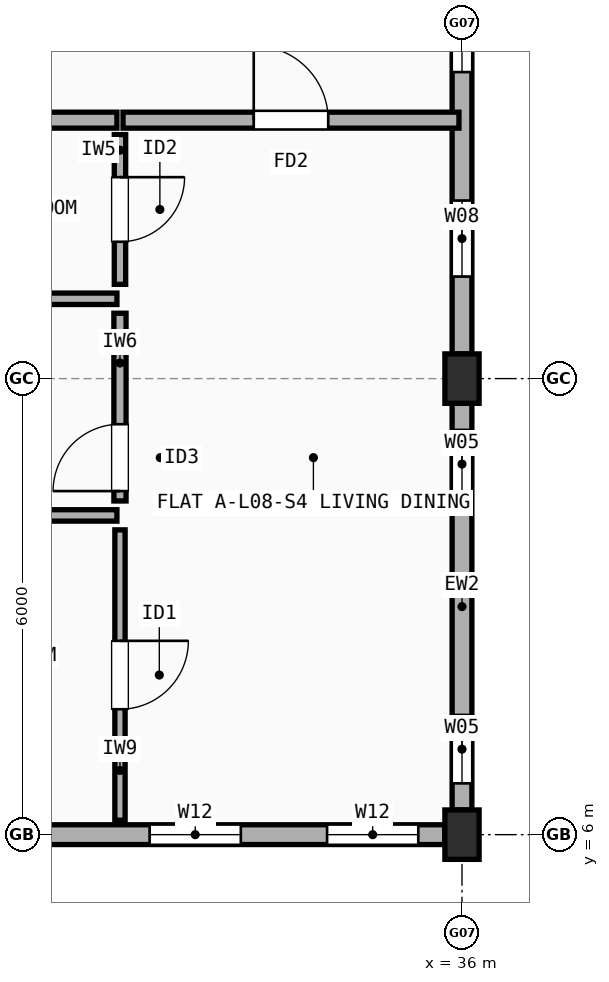
"""IFC4 building model, lengths in metres.
Left out: names, types, materials, properties, quantities, classifications, styles, units other than length and angle.
Written with IfcOpenShell. Run it as: python <this file> out.ifc"""

import sys

from ifc_helpers import new_model, si_unit, direction, frame, frame_2d, origin, origin_2d, place, context, subcontext, project, spatial, rectangle, extrude, element, fill, save


model = new_model("IFC4")
c1 = context("Model", 3, precision=1e-05, world=origin(), true_north=direction((0.0, 1.0)))
c2 = subcontext(c1, "Body", "Model", "MODEL_VIEW")
j1 = project(units=[si_unit("LENGTHUNIT", "METRE"), si_unit("PLANEANGLEUNIT", "RADIAN")], contexts=[c1])
p1 = place(None, origin())
s1 = spatial("IfcSite", under=j1, at=p1, CompositionType="ELEMENT")
p2 = place(p1, origin())
s2 = spatial("IfcBuilding", under=s1, at=p2, CompositionType="ELEMENT")
p3 = place(p2, frame((0.0, 0.0, 26.9)))
s3 = spatial("IfcBuildingStorey", under=s2, at=p3, CompositionType="ELEMENT", Elevation=26.9)
for number, where, z_axis, x_axis in (
    (1, (36.0, 6.0, 0.0), (0.0, 0.0, 1.0), (1.0, 0.0, 0.0)),
    (2, (36.0, 12.0, 0.0), (0.0, 0.0, 1.0), (1.0, 0.0, 0.0)),
):
    element("IfcColumn", number, at=place(p3, frame(where, z_axis=z_axis, x_axis=x_axis)), inside=s3, PredefinedType="COLUMN", context=c2, shape_type="SweptSolid", body=[
        extrude(rectangle(XDim=0.45, YDim=0.65, at=origin_2d()), origin(), (0.0, 0.0, 1.0), 2.98),
    ])
p4 = place(p3, frame((30.225, 6.0, 0.0), z_axis=(0.0, 0.0, 1.0), x_axis=(1.0, 0.0, 0.0)))
e3 = element("IfcWall", 3, at=p4, inside=s3, PredefinedType="STANDARD", context=c2, shape_type="SweptSolid", body=[
    extrude(rectangle(XDim=5.55, YDim=0.26, at=frame_2d((2.775, 0.0))), origin(), (0.0, 0.0, 1.0), 2.462),
])
p5 = place(p4, frame((1.665, 0.0, 0.9)))
e4 = element("IfcOpeningElement", 4, at=p5, cuts=e3, PredefinedType="OPENING", context=c2, shape_type="SweptSolid", body=[
    extrude(rectangle(XDim=1.2, YDim=1.35, at=frame_2d((0.6, 0.675))), frame((0.0, 0.14, 0.0), z_axis=(0.0, -1.0, 0.0), x_axis=(1.0, 0.0, 0.0)), (0.0, 0.0, 1.0), 0.28),
])
p6 = place(p4, frame((4.0, 0.0, 0.9)))
e5 = element("IfcOpeningElement", 5, at=p6, cuts=e3, PredefinedType="OPENING", context=c2, shape_type="SweptSolid", body=[
    extrude(rectangle(XDim=1.2, YDim=1.35, at=frame_2d((0.6, 0.675))), frame((0.0, 0.14, 0.0), z_axis=(0.0, -1.0, 0.0), x_axis=(1.0, 0.0, 0.0)), (0.0, 0.0, 1.0), 0.28),
])
p7 = place(p3, frame((36.0, 6.325, 0.0), z_axis=(0.0, 0.0, 1.0), x_axis=(0.0, 1.0, 0.0)))
e6 = element("IfcWall", 6, at=p7, inside=s3, PredefinedType="STANDARD", context=c2, shape_type="SweptSolid", body=[
    extrude(rectangle(XDim=5.35, YDim=0.26, at=frame_2d((2.675, 0.0))), origin(), (0.0, 0.0, 1.0), 2.462),
])
p8 = place(p7, frame((0.35, 0.0, 0.9)))
e7 = element("IfcOpeningElement", 7, at=p8, cuts=e6, PredefinedType="OPENING", context=c2, shape_type="SweptSolid", body=[
    extrude(rectangle(XDim=0.9, YDim=1.4, at=frame_2d((0.45, 0.7))), frame((0.0, 0.14, 0.0), z_axis=(0.0, -1.0, 0.0), x_axis=(1.0, 0.0, 0.0)), (0.0, 0.0, 1.0), 0.28),
])
p9 = place(p7, frame((4.1, 0.0, 0.9)))
e8 = element("IfcOpeningElement", 8, at=p9, cuts=e6, PredefinedType="OPENING", context=c2, shape_type="SweptSolid", body=[
    extrude(rectangle(XDim=0.9, YDim=1.4, at=frame_2d((0.45, 0.7))), frame((0.0, 0.14, 0.0), z_axis=(0.0, -1.0, 0.0), x_axis=(1.0, 0.0, 0.0)), (0.0, 0.0, 1.0), 0.28),
])
p10 = place(p3, frame((36.0, 12.325, 0.0), z_axis=(0.0, 0.0, 1.0), x_axis=(0.0, 1.0, 0.0)))
e9 = element("IfcWall", 9, at=p10, inside=s3, PredefinedType="STANDARD", context=c2, shape_type="SweptSolid", body=[
    extrude(rectangle(XDim=5.35, YDim=0.26, at=frame_2d((2.675, 0.0))), origin(), (0.0, 0.0, 1.0), 2.462),
])
p11 = place(p10, frame((1.018, 0.0, 0.9)))
e10 = element("IfcOpeningElement", 10, at=p11, cuts=e9, PredefinedType="OPENING", context=c2, shape_type="SweptSolid", body=[
    extrude(rectangle(XDim=1.0, YDim=1.4, at=frame_2d((0.5, 0.7))), frame((0.0, 0.14, 0.0), z_axis=(0.0, -1.0, 0.0), x_axis=(1.0, 0.0, 0.0)), (0.0, 0.0, 1.0), 0.28),
])
p12 = place(p10, frame((3.708, 0.0, 0.9)))
e11 = element("IfcOpeningElement", 11, at=p12, cuts=e9, PredefinedType="OPENING", context=c2, shape_type="SweptSolid", body=[
    extrude(rectangle(XDim=1.05, YDim=1.35, at=frame_2d((0.525, 0.675))), frame((0.0, 0.14, 0.0), z_axis=(0.0, -1.0, 0.0), x_axis=(1.0, 0.0, 0.0)), (0.0, 0.0, 1.0), 0.28),
])
p13 = place(p3, frame((27.04, 15.4, 0.0), z_axis=(0.0, 0.0, 1.0), x_axis=(1.0, 0.0, 0.0)))
e12 = element("IfcWall", 12, at=p13, inside=s3, PredefinedType="SOLIDWALL", context=c2, shape_type="SweptSolid", body=[
    extrude(rectangle(XDim=4.42, YDim=0.21, at=frame_2d((2.21, 0.0))), origin(), (0.0, 0.0, 1.0), 2.462),
])
p14 = place(p3, frame((31.54, 15.4, 0.0), z_axis=(0.0, 0.0, 1.0), x_axis=(1.0, 0.0, 0.0)))
e13 = element("IfcWall", 13, at=p14, inside=s3, PredefinedType="SOLIDWALL", context=c2, shape_type="SweptSolid", body=[
    extrude(rectangle(XDim=4.42, YDim=0.21, at=frame_2d((2.21, 0.0))), origin(), (0.0, 0.0, 1.0), 2.462),
])
p15 = place(p14, frame((1.72, 0.0, 0.0)))
e14 = element("IfcOpeningElement", 14, at=p15, cuts=e13, PredefinedType="OPENING", context=c2, shape_type="SweptSolid", body=[
    extrude(rectangle(XDim=0.98, YDim=2.15, at=frame_2d((0.49, 1.075))), frame((0.0, 0.115, 0.0), z_axis=(0.0, -1.0, 0.0), x_axis=(1.0, 0.0, 0.0)), (0.0, 0.0, 1.0), 0.23),
])
p16 = place(p3, frame((31.5, 6.19, 0.0), z_axis=(0.0, 0.0, 1.0), x_axis=(0.0, 1.0, 0.0)))
e15 = element("IfcWall", 15, at=p16, inside=s3, PredefinedType="PARTITIONING", context=c2, shape_type="SweptSolid", body=[
    extrude(rectangle(XDim=3.82, YDim=0.135, at=frame_2d((1.91, 0.0))), origin(), (0.0, 0.0, 1.0), 2.98),
])
p17 = place(p16, frame((1.46, 0.0, 0.0)))
e16 = element("IfcOpeningElement", 16, at=p17, cuts=e15, PredefinedType="OPENING", context=c2, shape_type="SweptSolid", body=[
    extrude(rectangle(XDim=0.9, YDim=2.1, at=frame_2d((0.45, 1.05))), frame((0.0, 0.077, 0.0), z_axis=(0.0, -1.0, 0.0), x_axis=(1.0, 0.0, 0.0)), (0.0, 0.0, 1.0), 0.155),
])
p18 = place(p3, frame((31.5, 10.39, 0.0), z_axis=(0.0, 0.0, 1.0), x_axis=(0.0, 1.0, 0.0)))
e17 = element("IfcWall", 17, at=p18, inside=s3, PredefinedType="PLUMBINGWALL", context=c2, shape_type="SweptSolid", body=[
    extrude(rectangle(XDim=2.47, YDim=0.16, at=frame_2d((1.235, 0.0))), origin(), (0.0, 0.0, 1.0), 2.548),
])
p19 = place(p18, frame((0.13, 0.0, 0.0)))
e18 = element("IfcOpeningElement", 18, at=p19, cuts=e17, PredefinedType="OPENING", context=c2, shape_type="SweptSolid", body=[
    extrude(rectangle(XDim=0.88, YDim=2.1, at=frame_2d((0.44, 1.05))), frame((0.0, 0.09, 0.0), z_axis=(0.0, -1.0, 0.0), x_axis=(1.0, 0.0, 0.0)), (0.0, 0.0, 1.0), 0.18),
])
p20 = place(p3, frame((31.5, 13.24, 0.0), z_axis=(0.0, 0.0, 1.0), x_axis=(0.0, 1.0, 0.0)))
e19 = element("IfcWall", 19, at=p20, inside=s3, PredefinedType="PARTITIONING", context=c2, shape_type="SweptSolid", body=[
    extrude(rectangle(XDim=1.97, YDim=0.15, at=frame_2d((0.985, 0.0))), origin(), (0.0, 0.0, 1.0), 2.98),
])
p21 = place(p20, frame((0.56, 0.0, 0.0)))
e20 = element("IfcOpeningElement", 20, at=p21, cuts=e19, PredefinedType="OPENING", context=c2, shape_type="SweptSolid", body=[
    extrude(rectangle(XDim=0.85, YDim=2.1, at=frame_2d((0.425, 1.05))), frame((0.0, 0.085, 0.0), z_axis=(0.0, -1.0, 0.0), x_axis=(1.0, 0.0, 0.0)), (0.0, 0.0, 1.0), 0.17),
])
for number, where, z_axis, x_axis in (
    (21, (27.04, 10.2, 0.0), (0.0, 0.0, 1.0), (1.0, 0.0, 0.0)),
    (22, (27.04, 13.05, 0.0), (0.0, 0.0, 1.0), (1.0, 0.0, 0.0)),
):
    element("IfcWall", number, at=place(p3, frame(where, z_axis=z_axis, x_axis=x_axis)), inside=s3, PredefinedType="PARTITIONING", context=c2, shape_type="SweptSolid", body=[
        extrude(rectangle(XDim=4.42, YDim=0.15, at=frame_2d((2.21, 0.0))), origin(), (0.0, 0.0, 1.0), 2.462),
    ])
p22 = place(p5, origin())
e23 = element("IfcWindow", 23, at=p22, inside=s3, PartitioningType="SINGLE_PANEL", PredefinedType="WINDOW", context=c2, shape_type="SweptSolid", body=[
    extrude(rectangle(XDim=1.2, YDim=1.35, at=frame_2d((0.6, 0.675))), frame((0.0, 0.03, 0.0), z_axis=(0.0, -1.0, 0.0), x_axis=(1.0, 0.0, 0.0)), (0.0, 0.0, 1.0), 0.06),
])
fill(e4, e23)
p23 = place(p6, origin())
e24 = element("IfcWindow", 24, at=p23, inside=s3, PartitioningType="SINGLE_PANEL", PredefinedType="WINDOW", context=c2, shape_type="SweptSolid", body=[
    extrude(rectangle(XDim=1.2, YDim=1.35, at=frame_2d((0.6, 0.675))), frame((0.0, 0.03, 0.0), z_axis=(0.0, -1.0, 0.0), x_axis=(1.0, 0.0, 0.0)), (0.0, 0.0, 1.0), 0.06),
])
fill(e5, e24)
p24 = place(p8, origin())
e25 = element("IfcWindow", 25, at=p24, inside=s3, PartitioningType="SINGLE_PANEL", PredefinedType="WINDOW", context=c2, shape_type="SweptSolid", body=[
    extrude(rectangle(XDim=0.9, YDim=1.4, at=frame_2d((0.45, 0.7))), frame((0.0, 0.03, 0.0), z_axis=(0.0, -1.0, 0.0), x_axis=(1.0, 0.0, 0.0)), (0.0, 0.0, 1.0), 0.06),
])
fill(e7, e25)
p25 = place(p9, origin())
e26 = element("IfcWindow", 26, at=p25, inside=s3, PartitioningType="SINGLE_PANEL", PredefinedType="WINDOW", context=c2, shape_type="SweptSolid", body=[
    extrude(rectangle(XDim=0.9, YDim=1.4, at=frame_2d((0.45, 0.7))), frame((0.0, 0.03, 0.0), z_axis=(0.0, -1.0, 0.0), x_axis=(1.0, 0.0, 0.0)), (0.0, 0.0, 1.0), 0.06),
])
fill(e8, e26)
p26 = place(p11, origin())
e27 = element("IfcWindow", 27, at=p26, inside=s3, PartitioningType="SINGLE_PANEL", PredefinedType="WINDOW", context=c2, shape_type="SweptSolid", body=[
    extrude(rectangle(XDim=1.0, YDim=1.4, at=frame_2d((0.5, 0.7))), frame((0.0, 0.03, 0.0), z_axis=(0.0, -1.0, 0.0), x_axis=(1.0, 0.0, 0.0)), (0.0, 0.0, 1.0), 0.06),
])
fill(e10, e27)
p27 = place(p12, origin())
e28 = element("IfcWindow", 28, at=p27, inside=s3, PartitioningType="SINGLE_PANEL", PredefinedType="WINDOW", context=c2, shape_type="SweptSolid", body=[
    extrude(rectangle(XDim=1.05, YDim=1.35, at=frame_2d((0.525, 0.675))), frame((0.0, 0.03, 0.0), z_axis=(0.0, -1.0, 0.0), x_axis=(1.0, 0.0, 0.0)), (0.0, 0.0, 1.0), 0.06),
])
fill(e11, e28)
p28 = place(p15, origin())
e29 = element("IfcDoor", 29, at=p28, inside=s3, OperationType="SINGLE_SWING_LEFT", PredefinedType="DOOR", context=c2, shape_type="SweptSolid", body=[
    extrude(rectangle(XDim=0.98, YDim=2.15, at=frame_2d((0.49, 1.075))), frame((0.0, 0.025, 0.0), z_axis=(0.0, -1.0, 0.0), x_axis=(1.0, 0.0, 0.0)), (0.0, 0.0, 1.0), 0.05),
])
fill(e14, e29)
p29 = place(p17, origin())
e30 = element("IfcDoor", 30, at=p29, inside=s3, OperationType="SINGLE_SWING_RIGHT", PredefinedType="DOOR", context=c2, shape_type="SweptSolid", body=[
    extrude(rectangle(XDim=0.9, YDim=2.1, at=frame_2d((0.45, 1.05))), frame((0.0, 0.025, 0.0), z_axis=(0.0, -1.0, 0.0), x_axis=(1.0, 0.0, 0.0)), (0.0, 0.0, 1.0), 0.05),
])
fill(e16, e30)
p30 = place(p19, origin())
e31 = element("IfcDoor", 31, at=p30, inside=s3, OperationType="SINGLE_SWING_LEFT", PredefinedType="DOOR", context=c2, shape_type="SweptSolid", body=[
    extrude(rectangle(XDim=0.88, YDim=2.1, at=frame_2d((0.44, 1.05))), frame((0.0, 0.025, 0.0), z_axis=(0.0, -1.0, 0.0), x_axis=(1.0, 0.0, 0.0)), (0.0, 0.0, 1.0), 0.05),
])
fill(e18, e31)
p31 = place(p21, origin())
e32 = element("IfcDoor", 32, at=p31, inside=s3, OperationType="SINGLE_SWING_RIGHT", PredefinedType="DOOR", context=c2, shape_type="SweptSolid", body=[
    extrude(rectangle(XDim=0.85, YDim=2.1, at=frame_2d((0.425, 1.05))), frame((0.0, 0.025, 0.0), z_axis=(0.0, -1.0, 0.0), x_axis=(1.0, 0.0, 0.0)), (0.0, 0.0, 1.0), 0.05),
])
fill(e20, e32)
save(model, sys.argv[1])
